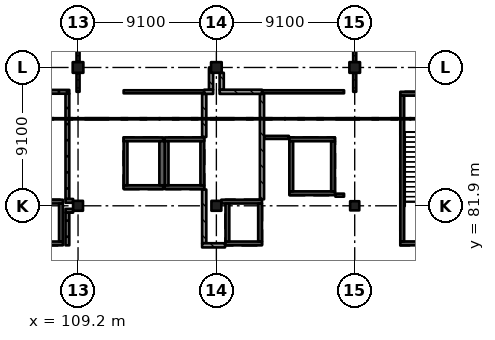
"""IFC4 building model, lengths in metres.
Left out: names, types, materials, properties, quantities, classifications, styles, units other than length and angle.
Written with IfcOpenShell. Run it as: python <this file> out.ifc"""

import sys

from ifc_helpers import new_model, si_unit, direction, frame, frame_2d, origin, origin_2d, place, context, subcontext, project, spatial, rectangle, extrude, element, fill, save


model = new_model("IFC4")
c1 = context("Model", 3, precision=1e-05, world=origin(), true_north=direction((0.0, 1.0)))
c2 = subcontext(c1, "Body", "Model", "MODEL_VIEW")
j1 = project(units=[si_unit("LENGTHUNIT", "METRE"), si_unit("PLANEANGLEUNIT", "RADIAN")], contexts=[c1])
p1 = place(None, origin())
s1 = spatial("IfcSite", under=j1, at=p1, CompositionType="ELEMENT")
p2 = place(p1, origin())
s2 = spatial("IfcBuilding", under=s1, at=p2, CompositionType="ELEMENT")
p3 = place(p2, frame((0.0, 0.0, 15.47)))
s3 = spatial("IfcBuildingStorey", under=s2, at=p3, CompositionType="ELEMENT", Elevation=15.47)
p4 = place(p3, frame((109.2, 81.9, 0.0), z_axis=(0.0, 0.0, 1.0), x_axis=(1.0, 0.0, 0.0)))
e1 = element("IfcColumn", 1, at=p4, inside=s3, PredefinedType="COLUMN", context=c2, shape_type="SweptSolid", body=[
    extrude(rectangle(XDim=0.65, YDim=0.65, at=origin_2d()), origin(), (0.0, 0.0, 1.0), 4.55),
])
p5 = place(p3, frame((109.2, 91.0, 0.0), z_axis=(0.0, 0.0, 1.0), x_axis=(1.0, 0.0, 0.0)))
e2 = element("IfcColumn", 2, at=p5, inside=s3, PredefinedType="COLUMN", context=c2, shape_type="SweptSolid", body=[
    extrude(rectangle(XDim=0.7, YDim=0.7, at=origin_2d()), origin(), (0.0, 0.0, 1.0), 4.55),
])
p6 = place(p3, frame((118.3, 81.9, 0.0), z_axis=(0.0, 0.0, 1.0), x_axis=(1.0, 0.0, 0.0)))
e3 = element("IfcColumn", 3, at=p6, inside=s3, PredefinedType="COLUMN", context=c2, shape_type="SweptSolid", body=[
    extrude(rectangle(XDim=0.65, YDim=0.65, at=origin_2d()), origin(), (0.0, 0.0, 1.0), 4.55),
])
p7 = place(p3, frame((118.3, 91.0, 0.0), z_axis=(0.0, 0.0, 1.0), x_axis=(1.0, 0.0, 0.0)))
e4 = element("IfcColumn", 4, at=p7, inside=s3, PredefinedType="COLUMN", context=c2, shape_type="SweptSolid", body=[
    extrude(rectangle(XDim=0.7, YDim=0.7, at=origin_2d()), origin(), (0.0, 0.0, 1.0), 4.55),
])
p8 = place(p3, frame((127.4, 81.9, 0.0), z_axis=(0.0, 0.0, 1.0), x_axis=(1.0, 0.0, 0.0)))
e5 = element("IfcColumn", 5, at=p8, inside=s3, PredefinedType="COLUMN", context=c2, shape_type="SweptSolid", body=[
    extrude(rectangle(XDim=0.6, YDim=0.6, at=origin_2d()), origin(), (0.0, 0.0, 1.0), 4.55),
])
p9 = place(p3, frame((127.4, 91.0, 0.0), z_axis=(0.0, 0.0, 1.0), x_axis=(1.0, 0.0, 0.0)))
e6 = element("IfcColumn", 6, at=p9, inside=s3, PredefinedType="COLUMN", context=c2, shape_type="SweptSolid", body=[
    extrude(rectangle(XDim=0.7, YDim=0.7, at=origin_2d()), origin(), (0.0, 0.0, 1.0), 4.55),
])
p10 = place(p3, frame((117.5, 83.125, 0.0), z_axis=(0.0, 0.0, 1.0), x_axis=(-1.0, 0.0, 0.0)))
e7 = element("IfcWall", 7, at=p10, inside=s3, PredefinedType="SHEAR", context=c2, shape_type="SweptSolid", body=[
    extrude(rectangle(XDim=2.6, YDim=0.25, at=frame_2d((1.3, 0.0))), origin(), (0.0, 0.0, 1.0), 4.55),
])
p11 = place(p3, frame((117.5, 86.275, 0.0), z_axis=(0.0, 0.0, 1.0), x_axis=(-1.0, 0.0, 0.0)))
e8 = element("IfcWall", 8, at=p11, inside=s3, PredefinedType="SHEAR", context=c2, shape_type="SweptSolid", body=[
    extrude(rectangle(XDim=2.6, YDim=0.25, at=frame_2d((1.3, 0.0))), origin(), (0.0, 0.0, 1.0), 4.55),
])
p12 = place(p11, frame((0.8, 0.0, 0.0)))
e9 = element("IfcOpeningElement", 9, at=p12, cuts=e8, PredefinedType="OPENING", context=c2, shape_type="SweptSolid", body=[
    extrude(rectangle(XDim=1.0, YDim=2.1, at=frame_2d((0.5, 1.05))), frame((0.0, 0.135, 0.0), z_axis=(0.0, -1.0, 0.0), x_axis=(1.0, 0.0, 0.0)), (0.0, 0.0, 1.0), 0.27),
])
for number, where, z_axis, x_axis in (
    (10, (115.025, 86.15, 0.0), (0.0, 0.0, 1.0), (0.0, -1.0, 0.0)),
    (11, (117.375, 86.15, 0.0), (0.0, 0.0, 1.0), (0.0, -1.0, 0.0)),
):
    element("IfcWall", number, at=place(p3, frame(where, z_axis=z_axis, x_axis=x_axis)), inside=s3, PredefinedType="SHEAR", context=c2, shape_type="SweptSolid", body=[
        extrude(rectangle(XDim=2.9, YDim=0.25, at=frame_2d((1.45, 0.0))), origin(), (0.0, 0.0, 1.0), 4.55),
    ])
p13 = place(p3, frame((114.8, 83.125, 0.0), z_axis=(0.0, 0.0, 1.0), x_axis=(-1.0, 0.0, 0.0)))
e12 = element("IfcWall", 12, at=p13, inside=s3, PredefinedType="SHEAR", context=c2, shape_type="SweptSolid", body=[
    extrude(rectangle(XDim=2.6, YDim=0.25, at=frame_2d((1.3, 0.0))), origin(), (0.0, 0.0, 1.0), 4.55),
])
p14 = place(p3, frame((114.8, 86.275, 0.0), z_axis=(0.0, 0.0, 1.0), x_axis=(-1.0, 0.0, 0.0)))
e13 = element("IfcWall", 13, at=p14, inside=s3, PredefinedType="SHEAR", context=c2, shape_type="SweptSolid", body=[
    extrude(rectangle(XDim=2.6, YDim=0.25, at=frame_2d((1.3, 0.0))), origin(), (0.0, 0.0, 1.0), 4.55),
])
p15 = place(p14, frame((0.8, 0.0, 0.0)))
e14 = element("IfcOpeningElement", 14, at=p15, cuts=e13, PredefinedType="OPENING", context=c2, shape_type="SweptSolid", body=[
    extrude(rectangle(XDim=1.0, YDim=2.1, at=frame_2d((0.5, 1.05))), frame((0.0, 0.135, 0.0), z_axis=(0.0, -1.0, 0.0), x_axis=(1.0, 0.0, 0.0)), (0.0, 0.0, 1.0), 0.27),
])
p16 = place(p3, frame((112.325, 86.15, 0.0), z_axis=(0.0, 0.0, 1.0), x_axis=(0.0, -1.0, 0.0)))
e15 = element("IfcWall", 15, at=p16, inside=s3, PredefinedType="SHEAR", context=c2, shape_type="SweptSolid", body=[
    extrude(rectangle(XDim=2.9, YDim=0.25, at=frame_2d((1.45, 0.0))), origin(), (0.0, 0.0, 1.0), 4.55),
])
p17 = place(p3, frame((114.725, 86.15, 0.0), z_axis=(0.0, 0.0, 1.0), x_axis=(0.0, -1.0, 0.0)))
e16 = element("IfcWall", 16, at=p17, inside=s3, PredefinedType="SHEAR", context=c2, shape_type="SweptSolid", body=[
    extrude(rectangle(XDim=2.9, YDim=0.35, at=frame_2d((1.45, 0.0))), origin(), (0.0, 0.0, 1.0), 4.55),
])
p18 = place(p3, frame((108.2, 79.425, 0.0), z_axis=(0.0, 0.0, 1.0), x_axis=(-1.0, 0.0, 0.0)))
e17 = element("IfcWall", 17, at=p18, inside=s3, PredefinedType="SHEAR", context=c2, shape_type="SweptSolid", body=[
    extrude(rectangle(XDim=2.4, YDim=0.25, at=frame_2d((1.2, 0.0))), origin(), (0.0, 0.0, 1.0), 4.55),
])
p19 = place(p18, frame((0.75, 0.0, 0.0)))
e18 = element("IfcOpeningElement", 18, at=p19, cuts=e17, PredefinedType="OPENING", context=c2, shape_type="SweptSolid", body=[
    extrude(rectangle(XDim=0.9, YDim=2.1, at=frame_2d((0.45, 1.05))), frame((0.0, 0.135, 0.0), z_axis=(0.0, -1.0, 0.0), x_axis=(1.0, 0.0, 0.0)), (0.0, 0.0, 1.0), 0.27),
])
p20 = place(p3, frame((108.2, 82.175, 0.0), z_axis=(0.0, 0.0, 1.0), x_axis=(-1.0, 0.0, 0.0)))
e19 = element("IfcWall", 19, at=p20, inside=s3, PredefinedType="SHEAR", context=c2, shape_type="SweptSolid", body=[
    extrude(rectangle(XDim=2.4, YDim=0.25, at=frame_2d((1.2, 0.0))), origin(), (0.0, 0.0, 1.0), 4.55),
])
p21 = place(p3, frame((108.075, 82.05, 0.0), z_axis=(0.0, 0.0, 1.0), x_axis=(0.0, -1.0, 0.0)))
e20 = element("IfcWall", 20, at=p21, inside=s3, PredefinedType="SHEAR", context=c2, shape_type="SweptSolid", body=[
    extrude(rectangle(XDim=2.5, YDim=0.25, at=frame_2d((1.25, 0.0))), origin(), (0.0, 0.0, 1.0), 4.55),
])
p22 = place(p3, frame((121.3, 79.425, 0.0), z_axis=(0.0, 0.0, 1.0), x_axis=(-1.0, 0.0, 0.0)))
e21 = element("IfcWall", 21, at=p22, inside=s3, PredefinedType="SHEAR", context=c2, shape_type="SweptSolid", body=[
    extrude(rectangle(XDim=2.4, YDim=0.25, at=frame_2d((1.2, 0.0))), origin(), (0.0, 0.0, 1.0), 4.55),
])
p23 = place(p3, frame((121.3, 82.175, 0.0), z_axis=(0.0, 0.0, 1.0), x_axis=(-1.0, 0.0, 0.0)))
e22 = element("IfcWall", 22, at=p23, inside=s3, PredefinedType="SHEAR", context=c2, shape_type="SweptSolid", body=[
    extrude(rectangle(XDim=2.675, YDim=0.25, at=frame_2d((1.337, 0.0))), origin(), (0.0, 0.0, 1.0), 4.55),
])
p24 = place(p3, frame((119.025, 82.05, 0.0), z_axis=(0.0, 0.0, 1.0), x_axis=(0.0, -1.0, 0.0)))
e23 = element("IfcWall", 23, at=p24, inside=s3, PredefinedType="SHEAR", context=c2, shape_type="SweptSolid", body=[
    extrude(rectangle(XDim=2.5, YDim=0.25, at=frame_2d((1.25, 0.0))), origin(), (0.0, 0.0, 1.0), 4.55),
])
p25 = place(p3, frame((121.175, 82.05, 0.0), z_axis=(0.0, 0.0, 1.0), x_axis=(0.0, -1.0, 0.0)))
e24 = element("IfcWall", 24, at=p25, inside=s3, PredefinedType="SHEAR", context=c2, shape_type="SweptSolid", body=[
    extrude(rectangle(XDim=2.5, YDim=0.25, at=frame_2d((1.25, 0.0))), origin(), (0.0, 0.0, 1.0), 4.55),
])
p26 = place(p25, frame((0.9, 0.0, 0.0)))
e25 = element("IfcOpeningElement", 25, at=p26, cuts=e24, PredefinedType="OPENING", context=c2, shape_type="SweptSolid", body=[
    extrude(rectangle(XDim=0.7, YDim=2.1, at=frame_2d((0.35, 1.05))), frame((0.0, 0.135, 0.0), z_axis=(0.0, -1.0, 0.0), x_axis=(1.0, 0.0, 0.0)), (0.0, 0.0, 1.0), 0.27),
])
p27 = place(p3, frame((126.1, 82.725, 0.0), z_axis=(0.0, 0.0, 1.0), x_axis=(-1.0, 0.0, 0.0)))
e26 = element("IfcWall", 26, at=p27, inside=s3, PredefinedType="SHEAR", context=c2, shape_type="SweptSolid", body=[
    extrude(rectangle(XDim=3.0, YDim=0.25, at=frame_2d((1.5, 0.0))), origin(), (0.0, 0.0, 1.0), 4.55),
])
p28 = place(p3, frame((126.1, 86.275, 0.0), z_axis=(0.0, 0.0, 1.0), x_axis=(-1.0, 0.0, 0.0)))
e27 = element("IfcWall", 27, at=p28, inside=s3, PredefinedType="SHEAR", context=c2, shape_type="SweptSolid", body=[
    extrude(rectangle(XDim=3.0, YDim=0.25, at=frame_2d((1.5, 0.0))), origin(), (0.0, 0.0, 1.0), 4.55),
])
p29 = place(p28, frame((0.95, 0.0, 0.0)))
e28 = element("IfcOpeningElement", 28, at=p29, cuts=e27, PredefinedType="OPENING", context=c2, shape_type="SweptSolid", body=[
    extrude(rectangle(XDim=1.1, YDim=2.1, at=frame_2d((0.55, 1.05))), frame((0.0, 0.135, 0.0), z_axis=(0.0, -1.0, 0.0), x_axis=(1.0, 0.0, 0.0)), (0.0, 0.0, 1.0), 0.27),
])
for number, where, z_axis, x_axis in (
    (29, (123.225, 86.15, 0.0), (0.0, 0.0, 1.0), (0.0, -1.0, 0.0)),
    (30, (125.975, 86.15, 0.0), (0.0, 0.0, 1.0), (0.0, -1.0, 0.0)),
):
    element("IfcWall", number, at=place(p3, frame(where, z_axis=z_axis, x_axis=x_axis)), inside=s3, PredefinedType="SHEAR", context=c2, shape_type="SweptSolid", body=[
        extrude(rectangle(XDim=3.3, YDim=0.25, at=frame_2d((1.65, 0.0))), origin(), (0.0, 0.0, 1.0), 4.55),
    ])
p30 = place(p3, frame((135.8, 79.425, 0.0), z_axis=(0.0, 0.0, 1.0), x_axis=(-1.0, 0.0, 0.0)))
e31 = element("IfcWall", 31, at=p30, inside=s3, PredefinedType="SHEAR", context=c2, shape_type="SweptSolid", body=[
    extrude(rectangle(XDim=5.4, YDim=0.25, at=frame_2d((2.7, 0.0))), origin(), (0.0, 0.0, 1.0), 4.55),
])
p31 = place(p3, frame((135.8, 89.275, 0.0), z_axis=(0.0, 0.0, 1.0), x_axis=(-1.0, 0.0, 0.0)))
e32 = element("IfcWall", 32, at=p31, inside=s3, PredefinedType="SHEAR", context=c2, shape_type="SweptSolid", body=[
    extrude(rectangle(XDim=5.4, YDim=0.25, at=frame_2d((2.7, 0.0))), origin(), (0.0, 0.0, 1.0), 4.55),
])
p32 = place(p31, frame((1.5, 0.0, 0.0)))
e33 = element("IfcOpeningElement", 33, at=p32, cuts=e32, PredefinedType="OPENING", context=c2, shape_type="SweptSolid", body=[
    extrude(rectangle(XDim=2.4, YDim=2.1, at=frame_2d((1.2, 1.05))), frame((0.0, 0.135, 0.0), z_axis=(0.0, -1.0, 0.0), x_axis=(1.0, 0.0, 0.0)), (0.0, 0.0, 1.0), 0.27),
])
p33 = place(p3, frame((130.525, 89.15, 0.0), z_axis=(0.0, 0.0, 1.0), x_axis=(0.0, -1.0, 0.0)))
e34 = element("IfcWall", 34, at=p33, inside=s3, PredefinedType="SHEAR", context=c2, shape_type="SweptSolid", body=[
    extrude(rectangle(XDim=9.6, YDim=0.25, at=frame_2d((4.8, 0.0))), origin(), (0.0, 0.0, 1.0), 4.55),
])
p34 = place(p3, frame((108.375, 81.575, 0.0), z_axis=(0.0, 0.0, 1.0), x_axis=(1.0, 0.0, 0.0)))
e35 = element("IfcWall", 35, at=p34, inside=s3, PredefinedType="SOLIDWALL", context=c2, shape_type="SweptSolid", body=[
    extrude(rectangle(XDim=0.5, YDim=0.25, at=frame_2d((0.25, 0.0))), origin(), (0.0, 0.0, 1.0), 4.3),
])
p35 = place(p3, frame((108.5, 79.3, 0.0), z_axis=(0.0, 0.0, 1.0), x_axis=(0.0, 1.0, 0.0)))
e36 = element("IfcWall", 36, at=p35, inside=s3, PredefinedType="SOLIDWALL", context=c2, shape_type="SweptSolid", body=[
    extrude(rectangle(XDim=2.15, YDim=0.25, at=frame_2d((1.075, 0.0))), origin(), (0.0, 0.0, 1.0), 4.3),
])
p36 = place(p3, frame((108.5, 82.35, 0.0), z_axis=(0.0, 0.0, 1.0), x_axis=(0.0, 1.0, 0.0)))
e37 = element("IfcWall", 37, at=p36, inside=s3, PredefinedType="SOLIDWALL", context=c2, shape_type="SweptSolid", body=[
    extrude(rectangle(XDim=6.925, YDim=0.25, at=frame_2d((3.462, 0.0))), origin(), (0.0, 0.0, 1.0), 4.3),
])
p37 = place(p3, frame((108.625, 89.4, 0.0), z_axis=(0.0, 0.0, 1.0), x_axis=(-1.0, 0.0, 0.0)))
e38 = element("IfcWall", 38, at=p37, inside=s3, PredefinedType="SOLIDWALL", context=c2, shape_type="SweptSolid", body=[
    extrude(rectangle(XDim=3.675, YDim=0.25, at=frame_2d((1.837, 0.0))), origin(), (0.0, 0.0, 1.0), 4.3),
])
p38 = place(p37, frame((1.45, 0.0, 0.0)))
e39 = element("IfcOpeningElement", 39, at=p38, cuts=e38, PredefinedType="OPENING", context=c2, shape_type="SweptSolid", body=[
    extrude(rectangle(XDim=0.8, YDim=2.1, at=frame_2d((0.4, 1.05))), frame((0.0, 0.135, 0.0), z_axis=(0.0, -1.0, 0.0), x_axis=(1.0, 0.0, 0.0)), (0.0, 0.0, 1.0), 0.27),
])
p39 = place(p3, frame((108.875, 82.225, 0.0), z_axis=(0.0, 0.0, 1.0), x_axis=(-1.0, 0.0, 0.0)))
e40 = element("IfcWall", 40, at=p39, inside=s3, PredefinedType="SOLIDWALL", context=c2, shape_type="SweptSolid", body=[
    extrude(rectangle(XDim=0.5, YDim=0.25, at=frame_2d((0.25, 0.0))), origin(), (0.0, 0.0, 1.0), 4.3),
])
p40 = place(p3, frame((109.2, 89.4, 0.0), z_axis=(0.0, 0.0, 1.0), x_axis=(0.0, 1.0, 0.0)))
e41 = element("IfcWall", 41, at=p40, inside=s3, PredefinedType="PARTITIONING", context=c2, shape_type="SweptSolid", body=[
    extrude(rectangle(XDim=1.25, YDim=0.2, at=frame_2d((0.625, 0.0))), origin(), (0.0, 0.0, 1.0), 3.55),
])
p41 = place(p3, frame((109.2, 91.35, 0.0), z_axis=(0.0, 0.0, 1.0), x_axis=(0.0, 1.0, 0.0)))
e42 = element("IfcWall", 42, at=p41, inside=s3, PredefinedType="PARTITIONING", context=c2, shape_type="SweptSolid", body=[
    extrude(rectangle(XDim=6.95, YDim=0.2, at=frame_2d((3.475, 0.0))), origin(), (0.0, 0.0, 1.0), 3.55),
])
p42 = place(p41, frame((0.85, 0.0, 0.0)))
e43 = element("IfcOpeningElement", 43, at=p42, cuts=e42, PredefinedType="OPENING", context=c2, shape_type="SweptSolid", body=[
    extrude(rectangle(XDim=1.8, YDim=2.4, at=frame_2d((0.9, 1.2))), frame((0.0, 0.11, 0.0), z_axis=(0.0, -1.0, 0.0), x_axis=(1.0, 0.0, 0.0)), (0.0, 0.0, 1.0), 0.22),
])
p43 = place(p41, frame((4.35, 0.0, 0.0)))
e44 = element("IfcOpeningElement", 44, at=p43, cuts=e42, PredefinedType="OPENING", context=c2, shape_type="SweptSolid", body=[
    extrude(rectangle(XDim=1.8, YDim=2.4, at=frame_2d((0.9, 1.2))), frame((0.0, 0.11, 0.0), z_axis=(0.0, -1.0, 0.0), x_axis=(1.0, 0.0, 0.0)), (0.0, 0.0, 1.0), 0.22),
])
p44 = place(p3, frame((117.5, 79.438, 0.0), z_axis=(0.0, 0.0, 1.0), x_axis=(0.0, 1.0, 0.0)))
e45 = element("IfcWall", 45, at=p44, inside=s3, PredefinedType="SOLIDWALL", context=c2, shape_type="SweptSolid", body=[
    extrude(rectangle(XDim=3.532, YDim=0.275, at=frame_2d((1.766, 0.0))), origin(), (0.0, 0.0, 1.0), 4.3),
])
p45 = place(p3, frame((117.5, 86.43, 0.0), z_axis=(0.0, 0.0, 1.0), x_axis=(0.0, 1.0, 0.0)))
e46 = element("IfcWall", 46, at=p45, inside=s3, PredefinedType="SOLIDWALL", context=c2, shape_type="SweptSolid", body=[
    extrude(rectangle(XDim=2.833, YDim=0.275, at=frame_2d((1.416, 0.0))), origin(), (0.0, 0.0, 1.0), 4.3),
])
p46 = place(p3, frame((117.5, 89.4, 0.0), z_axis=(0.0, 0.0, 1.0), x_axis=(-1.0, 0.0, 0.0)))
e47 = element("IfcWall", 47, at=p46, inside=s3, PredefinedType="PARTITIONING", context=c2, shape_type="SweptSolid", body=[
    extrude(rectangle(XDim=5.3, YDim=0.2, at=frame_2d((2.65, 0.0))), origin(), (0.0, 0.0, 1.0), 4.3),
])
p47 = place(p46, frame((1.75, 0.0, 0.0)))
e48 = element("IfcOpeningElement", 48, at=p47, cuts=e47, PredefinedType="OPENING", context=c2, shape_type="SweptSolid", body=[
    extrude(rectangle(XDim=1.8, YDim=2.4, at=frame_2d((0.9, 1.2))), frame((0.0, 0.11, 0.0), z_axis=(0.0, -1.0, 0.0), x_axis=(1.0, 0.0, 0.0)), (0.0, 0.0, 1.0), 0.22),
])
p48 = place(p3, frame((117.95, 89.538, 0.0), z_axis=(0.0, 0.0, 1.0), x_axis=(0.0, 1.0, 0.0)))
e49 = element("IfcWall", 49, at=p48, inside=s3, PredefinedType="SOLIDWALL", context=c2, shape_type="SweptSolid", body=[
    extrude(rectangle(XDim=1.462, YDim=0.275, at=frame_2d((0.731, 0.0))), origin(), (0.0, 0.0, 1.0), 4.3),
])
p49 = place(p3, frame((118.087, 89.4, 0.0), z_axis=(0.0, 0.0, 1.0), x_axis=(-1.0, 0.0, 0.0)))
e50 = element("IfcWall", 50, at=p49, inside=s3, PredefinedType="SOLIDWALL", context=c2, shape_type="SweptSolid", body=[
    extrude(rectangle(XDim=0.587, YDim=0.275, at=frame_2d((0.294, 0.0))), origin(), (0.0, 0.0, 1.0), 4.3),
])
p50 = place(p3, frame((118.65, 89.538, 0.0), z_axis=(0.0, 0.0, 1.0), x_axis=(0.0, 1.0, 0.0)))
e51 = element("IfcWall", 51, at=p50, inside=s3, PredefinedType="SOLIDWALL", context=c2, shape_type="SweptSolid", body=[
    extrude(rectangle(XDim=1.112, YDim=0.275, at=frame_2d((0.556, 0.0))), origin(), (0.0, 0.0, 1.0), 4.3),
])
p51 = place(p3, frame((118.87, 79.3, 0.0), z_axis=(0.0, 0.0, 1.0), x_axis=(-1.0, 0.0, 0.0)))
e52 = element("IfcWall", 52, at=p51, inside=s3, PredefinedType="SOLIDWALL", context=c2, shape_type="SweptSolid", body=[
    extrude(rectangle(XDim=1.508, YDim=0.275, at=frame_2d((0.754, 0.0))), origin(), (0.0, 0.0, 1.0), 4.3),
])
p52 = place(p3, frame((121.3, 82.33, 0.0), z_axis=(0.0, 0.0, 1.0), x_axis=(0.0, 1.0, 0.0)))
e53 = element("IfcWall", 53, at=p52, inside=s3, PredefinedType="SOLIDWALL", context=c2, shape_type="SweptSolid", body=[
    extrude(rectangle(XDim=6.932, YDim=0.275, at=frame_2d((3.466, 0.0))), origin(), (0.0, 0.0, 1.0), 4.3),
])
p53 = place(p3, frame((121.3, 89.4, 0.0), z_axis=(0.0, 0.0, 1.0), x_axis=(-1.0, 0.0, 0.0)))
e54 = element("IfcWall", 54, at=p53, inside=s3, PredefinedType="SOLIDWALL", context=c2, shape_type="SweptSolid", body=[
    extrude(rectangle(XDim=2.788, YDim=0.275, at=frame_2d((1.394, 0.0))), origin(), (0.0, 0.0, 1.0), 4.3),
])
p54 = place(p53, frame((0.75, 0.0, 0.0)))
e55 = element("IfcOpeningElement", 55, at=p54, cuts=e54, PredefinedType="OPENING", context=c2, shape_type="SweptSolid", body=[
    extrude(rectangle(XDim=1.2, YDim=2.4, at=frame_2d((0.6, 1.2))), frame((0.0, 0.147, 0.0), z_axis=(0.0, -1.0, 0.0), x_axis=(1.0, 0.0, 0.0)), (0.0, 0.0, 1.0), 0.295),
])
p55 = place(p3, frame((123.07, 86.4, 0.0), z_axis=(0.0, 0.0, 1.0), x_axis=(-1.0, 0.0, 0.0)))
e56 = element("IfcWall", 56, at=p55, inside=s3, PredefinedType="PARTITIONING", context=c2, shape_type="SweptSolid", body=[
    extrude(rectangle(XDim=1.633, YDim=0.2, at=frame_2d((0.816, 0.0))), origin(), (0.0, 0.0, 1.0), 4.3),
])
p56 = place(p3, frame((126.7, 82.6, 0.0), z_axis=(0.0, 0.0, 1.0), x_axis=(-1.0, 0.0, 0.0)))
e57 = element("IfcWall", 57, at=p56, inside=s3, PredefinedType="PARTITIONING", context=c2, shape_type="SweptSolid", body=[
    extrude(rectangle(XDim=0.57, YDim=0.2, at=frame_2d((0.285, 0.0))), origin(), (0.0, 0.0, 1.0), 4.3),
])
p57 = place(p3, frame((126.7, 89.4, 0.0), z_axis=(0.0, 0.0, 1.0), x_axis=(-1.0, 0.0, 0.0)))
e58 = element("IfcWall", 58, at=p57, inside=s3, PredefinedType="PARTITIONING", context=c2, shape_type="SweptSolid", body=[
    extrude(rectangle(XDim=5.4, YDim=0.2, at=frame_2d((2.7, 0.0))), origin(), (0.0, 0.0, 1.0), 4.3),
])
p58 = place(p57, frame((1.85, 0.0, 0.0)))
e59 = element("IfcOpeningElement", 59, at=p58, cuts=e58, PredefinedType="OPENING", context=c2, shape_type="SweptSolid", body=[
    extrude(rectangle(XDim=1.8, YDim=2.4, at=frame_2d((0.9, 1.2))), frame((0.0, 0.11, 0.0), z_axis=(0.0, -1.0, 0.0), x_axis=(1.0, 0.0, 0.0)), (0.0, 0.0, 1.0), 0.22),
])
p59 = place(p3, frame((127.4, 89.4, 0.0), z_axis=(0.0, 0.0, 1.0), x_axis=(0.0, 1.0, 0.0)))
e60 = element("IfcWall", 60, at=p59, inside=s3, PredefinedType="PARTITIONING", context=c2, shape_type="SweptSolid", body=[
    extrude(rectangle(XDim=1.25, YDim=0.2, at=frame_2d((0.625, 0.0))), origin(), (0.0, 0.0, 1.0), 3.55),
])
p60 = place(p3, frame((127.4, 91.35, 0.0), z_axis=(0.0, 0.0, 1.0), x_axis=(0.0, 1.0, 0.0)))
e61 = element("IfcWall", 61, at=p60, inside=s3, PredefinedType="PARTITIONING", context=c2, shape_type="SweptSolid", body=[
    extrude(rectangle(XDim=6.912, YDim=0.2, at=frame_2d((3.456, 0.0))), origin(), (0.0, 0.0, 1.0), 3.55),
])
p61 = place(p60, frame((0.85, 0.0, 0.0)))
e62 = element("IfcOpeningElement", 62, at=p61, cuts=e61, PredefinedType="OPENING", context=c2, shape_type="SweptSolid", body=[
    extrude(rectangle(XDim=1.8, YDim=2.4, at=frame_2d((0.9, 1.2))), frame((0.0, 0.11, 0.0), z_axis=(0.0, -1.0, 0.0), x_axis=(1.0, 0.0, 0.0)), (0.0, 0.0, 1.0), 0.22),
])
p62 = place(p60, frame((4.25, 0.0, 0.0)))
e63 = element("IfcOpeningElement", 63, at=p62, cuts=e61, PredefinedType="OPENING", context=c2, shape_type="SweptSolid", body=[
    extrude(rectangle(XDim=1.8, YDim=2.4, at=frame_2d((0.9, 1.2))), frame((0.0, 0.11, 0.0), z_axis=(0.0, -1.0, 0.0), x_axis=(1.0, 0.0, 0.0)), (0.0, 0.0, 1.0), 0.22),
])
p63 = place(p54, origin())
e64 = element("IfcDoor", 64, at=p63, inside=s3, OperationType="SINGLE_SWING_RIGHT", PredefinedType="DOOR", context=c2, shape_type="SweptSolid", body=[
    extrude(rectangle(XDim=1.2, YDim=2.4, at=frame_2d((0.6, 1.2))), frame((0.0, 0.025, 0.0), z_axis=(0.0, -1.0, 0.0), x_axis=(1.0, 0.0, 0.0)), (0.0, 0.0, 1.0), 0.05),
])
fill(e55, e64)
p64 = place(p47, origin())
e65 = element("IfcDoor", 65, at=p64, inside=s3, OperationType="DOUBLE_DOOR_SINGLE_SWING", PredefinedType="DOOR", context=c2, shape_type="SweptSolid", body=[
    extrude(rectangle(XDim=1.8, YDim=2.4, at=frame_2d((0.9, 1.2))), frame((0.0, 0.025, 0.0), z_axis=(0.0, -1.0, 0.0), x_axis=(1.0, 0.0, 0.0)), (0.0, 0.0, 1.0), 0.05),
])
fill(e48, e65)
p65 = place(p58, origin())
e66 = element("IfcDoor", 66, at=p65, inside=s3, OperationType="DOUBLE_DOOR_SINGLE_SWING", PredefinedType="DOOR", context=c2, shape_type="SweptSolid", body=[
    extrude(rectangle(XDim=1.8, YDim=2.4, at=frame_2d((0.9, 1.2))), frame((0.0, 0.025, 0.0), z_axis=(0.0, -1.0, 0.0), x_axis=(1.0, 0.0, 0.0)), (0.0, 0.0, 1.0), 0.05),
])
fill(e59, e66)
p66 = place(p26, origin())
e67 = element("IfcDoor", 67, at=p66, inside=s3, OperationType="SINGLE_SWING_RIGHT", PredefinedType="DOOR", context=c2, shape_type="SweptSolid", body=[
    extrude(rectangle(XDim=0.7, YDim=2.1, at=frame_2d((0.35, 1.05))), frame((0.0, 0.025, 0.0), z_axis=(0.0, -1.0, 0.0), x_axis=(1.0, 0.0, 0.0)), (0.0, 0.0, 1.0), 0.05),
])
fill(e25, e67)
p67 = place(p12, origin())
e68 = element("IfcDoor", 68, at=p67, inside=s3, OperationType="DOUBLE_DOOR_SLIDING", PredefinedType="DOOR", context=c2, shape_type="SweptSolid", body=[
    extrude(rectangle(XDim=1.0, YDim=2.1, at=frame_2d((0.5, 1.05))), frame((0.0, 0.025, 0.0), z_axis=(0.0, -1.0, 0.0), x_axis=(1.0, 0.0, 0.0)), (0.0, 0.0, 1.0), 0.05),
])
fill(e9, e68)
p68 = place(p15, origin())
e69 = element("IfcDoor", 69, at=p68, inside=s3, OperationType="DOUBLE_DOOR_SLIDING", PredefinedType="DOOR", context=c2, shape_type="SweptSolid", body=[
    extrude(rectangle(XDim=1.0, YDim=2.1, at=frame_2d((0.5, 1.05))), frame((0.0, 0.025, 0.0), z_axis=(0.0, -1.0, 0.0), x_axis=(1.0, 0.0, 0.0)), (0.0, 0.0, 1.0), 0.05),
])
fill(e14, e69)
p69 = place(p29, origin())
e70 = element("IfcDoor", 70, at=p69, inside=s3, OperationType="DOUBLE_DOOR_SLIDING", PredefinedType="DOOR", context=c2, shape_type="SweptSolid", body=[
    extrude(rectangle(XDim=1.1, YDim=2.1, at=frame_2d((0.55, 1.05))), frame((0.0, 0.025, 0.0), z_axis=(0.0, -1.0, 0.0), x_axis=(1.0, 0.0, 0.0)), (0.0, 0.0, 1.0), 0.05),
])
fill(e28, e70)
save(model, sys.argv[1])
